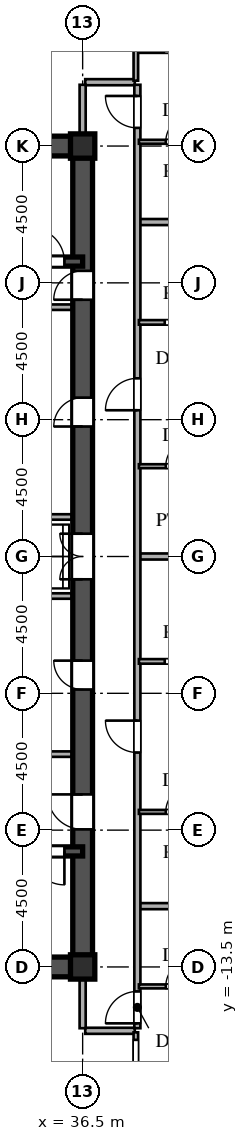
"""IFC4 building model, lengths in metres.
Left out: names, types, materials, properties, quantities, classifications, styles, units other than length and angle.
Written with IfcOpenShell. Run it as: python <this file> out.ifc"""

import sys

from ifc_helpers import new_model, si_unit, direction, frame, frame_2d, origin, origin_2d, place, context, subcontext, project, spatial, rectangle, i_section, extrude, source, transform, mapped, element, fill, save


model = new_model("IFC4")
c1 = context("Model", 3, precision=1e-05, world=origin(), true_north=direction((0.0, 1.0)))
c2 = subcontext(c1, "Body", "Model", "MODEL_VIEW")
j1 = project(units=[si_unit("LENGTHUNIT", "METRE"), si_unit("PLANEANGLEUNIT", "RADIAN")], contexts=[c1])
p1 = place(None, origin())
s1 = spatial("IfcSite", under=j1, at=p1, CompositionType="ELEMENT")
p2 = place(p1, origin())
s2 = spatial("IfcBuilding", under=s1, at=p2, CompositionType="ELEMENT")
p3 = place(p2, frame((0.0, 0.0, 83.7)))
s3 = spatial("IfcBuildingStorey", under=s2, at=p3, CompositionType="ELEMENT", Elevation=83.7)
m1 = source(origin(), c2, "Body", "SweptSolid", [
    extrude(i_section(OverallWidth=0.8, OverallDepth=0.8, WebThickness=0.032, FlangeThickness=0.05, at=origin_2d()), origin(), (0.0, 0.0, 1.0), 3.6),
])
for number, where, z_axis, x_axis in (
    (1, (36.5, -13.5, 0.0), (0.0, 0.0, 1.0), (1.0, 0.0, 0.0)),
    (2, (36.5, 13.5, 0.0), (0.0, 0.0, 1.0), (1.0, 0.0, 0.0)),
):
    element("IfcColumn", number, at=place(p3, frame(where, z_axis=z_axis, x_axis=x_axis)), inside=s3, PredefinedType="COLUMN", context=c2, shape_type="MappedRepresentation", body=[
        mapped(m1, transform((0.0, 0.0, 0.0), scale=1.0)),
    ])
for number, where, z_axis, x_axis in (
    (3, (27.5, -13.5, 0.0), (0.0, 0.0, 1.0), (1.0, 0.0, 0.0)),
    (4, (27.5, 13.5, 0.0), (0.0, 0.0, 1.0), (1.0, 0.0, 0.0)),
):
    element("IfcWall", number, at=place(p3, frame(where, z_axis=z_axis, x_axis=x_axis)), inside=s3, PredefinedType="SHEAR", context=c2, shape_type="SweptSolid", body=[
        extrude(rectangle(XDim=9.0, YDim=0.65, at=frame_2d((4.5, 0.0))), origin(), (0.0, 0.0, 1.0), 3.34),
    ])
p4 = place(p3, frame((36.5, -13.65, 0.0), z_axis=(0.0, 0.0, 1.0), x_axis=(0.0, 1.0, 0.0)))
e5 = element("IfcWall", 5, at=p4, inside=s3, PredefinedType="SHEAR", context=c2, shape_type="SweptSolid", body=[
    extrude(rectangle(XDim=7.15, YDim=0.65, at=frame_2d((3.575, 0.0))), origin(), (0.0, 0.0, 1.0), 3.34),
])
p5 = place(p4, frame((4.675, 0.0, 0.0)))
e6 = element("IfcOpeningElement", 6, at=p5, cuts=e5, PredefinedType="OPENING", context=c2, shape_type="SweptSolid", body=[
    extrude(rectangle(XDim=1.15, YDim=2.2, at=frame_2d((0.575, 1.1))), frame((0.0, 0.335, 0.0), z_axis=(0.0, -1.0, 0.0), x_axis=(1.0, 0.0, 0.0)), (0.0, 0.0, 1.0), 0.67),
])
p6 = place(p3, frame((36.5, -1.3, 0.0), z_axis=(0.0, 0.0, 1.0), x_axis=(0.0, 1.0, 0.0)))
e7 = element("IfcWall", 7, at=p6, inside=s3, PredefinedType="SHEAR", context=c2, shape_type="SweptSolid", body=[
    extrude(rectangle(XDim=2.6, YDim=0.65, at=frame_2d((1.3, 0.0))), origin(), (0.0, 0.0, 1.0), 3.34),
])
p7 = place(p6, frame((0.55, 0.0, 0.0)))
e8 = element("IfcOpeningElement", 8, at=p7, cuts=e7, PredefinedType="OPENING", context=c2, shape_type="SweptSolid", body=[
    extrude(rectangle(XDim=1.5, YDim=2.3, at=frame_2d((0.75, 1.15))), frame((0.0, 0.335, 0.0), z_axis=(0.0, -1.0, 0.0), x_axis=(1.0, 0.0, 0.0)), (0.0, 0.0, 1.0), 0.67),
])
p8 = place(p3, frame((36.5, 8.2, 0.0), z_axis=(0.0, 0.0, 1.0), x_axis=(0.0, 1.0, 0.0)))
e9 = element("IfcWall", 9, at=p8, inside=s3, PredefinedType="SHEAR", context=c2, shape_type="SweptSolid", body=[
    extrude(rectangle(XDim=5.45, YDim=0.65, at=frame_2d((2.725, 0.0))), origin(), (0.0, 0.0, 1.0), 3.34),
])
p9 = place(p8, frame((0.245, 0.0, 0.0)))
e10 = element("IfcOpeningElement", 10, at=p9, cuts=e9, PredefinedType="OPENING", context=c2, shape_type="SweptSolid", body=[
    extrude(rectangle(XDim=0.95, YDim=2.15, at=frame_2d((0.475, 1.075))), frame((0.0, 0.335, 0.0), z_axis=(0.0, -1.0, 0.0), x_axis=(1.0, 0.0, 0.0)), (0.0, 0.0, 1.0), 0.67),
])
p10 = place(p3, frame((36.5, -6.5, 0.0), z_axis=(0.0, 0.0, 1.0), x_axis=(0.0, 1.0, 0.0)))
e11 = element("IfcWall", 11, at=p10, inside=s3, PredefinedType="SHEAR", context=c2, shape_type="SweptSolid", body=[
    extrude(rectangle(XDim=5.2, YDim=0.65, at=frame_2d((2.6, 0.0))), origin(), (0.0, 0.0, 1.0), 3.34),
])
p11 = place(p10, frame((2.125, 0.0, 0.0)))
e12 = element("IfcOpeningElement", 12, at=p11, cuts=e11, PredefinedType="OPENING", context=c2, shape_type="SweptSolid", body=[
    extrude(rectangle(XDim=0.95, YDim=2.15, at=frame_2d((0.475, 1.075))), frame((0.0, 0.335, 0.0), z_axis=(0.0, -1.0, 0.0), x_axis=(1.0, 0.0, 0.0)), (0.0, 0.0, 1.0), 0.67),
])
p12 = place(p3, frame((36.5, 1.3, 0.0), z_axis=(0.0, 0.0, 1.0), x_axis=(0.0, 1.0, 0.0)))
e13 = element("IfcWall", 13, at=p12, inside=s3, PredefinedType="SHEAR", context=c2, shape_type="SweptSolid", body=[
    extrude(rectangle(XDim=6.9, YDim=0.65, at=frame_2d((3.45, 0.0))), origin(), (0.0, 0.0, 1.0), 3.34),
])
p13 = place(p12, frame((2.975, 0.0, 0.0)))
e14 = element("IfcOpeningElement", 14, at=p13, cuts=e13, PredefinedType="OPENING", context=c2, shape_type="SweptSolid", body=[
    extrude(rectangle(XDim=0.95, YDim=2.15, at=frame_2d((0.475, 1.075))), frame((0.0, 0.335, 0.0), z_axis=(0.0, -1.0, 0.0), x_axis=(1.0, 0.0, 0.0)), (0.0, 0.0, 1.0), 0.67),
])
p14 = place(p3, frame((27.5, -9.7, 0.0), z_axis=(0.0, 0.0, 1.0), x_axis=(1.0, 0.0, 0.0)))
e15 = element("IfcWall", 15, at=p14, inside=s3, PredefinedType="SHEAR", context=c2, shape_type="SweptSolid", body=[
    extrude(rectangle(XDim=9.0, YDim=0.3, at=frame_2d((4.5, 0.0))), origin(), (0.0, 0.0, 1.0), 3.34),
])
p15 = place(p14, frame((7.3, 0.0, 0.0)))
e16 = element("IfcOpeningElement", 16, at=p15, cuts=e15, PredefinedType="OPENING", context=c2, shape_type="SweptSolid", body=[
    extrude(rectangle(XDim=1.1, YDim=2.2, at=frame_2d((0.55, 1.1))), frame((0.0, 0.16, 0.0), z_axis=(0.0, -1.0, 0.0), x_axis=(1.0, 0.0, 0.0)), (0.0, 0.0, 1.0), 0.32),
])
p16 = place(p3, frame((27.5, 9.7, 0.0), z_axis=(0.0, 0.0, 1.0), x_axis=(1.0, 0.0, 0.0)))
e17 = element("IfcWall", 17, at=p16, inside=s3, PredefinedType="SHEAR", context=c2, shape_type="SweptSolid", body=[
    extrude(rectangle(XDim=9.0, YDim=0.3, at=frame_2d((4.5, 0.0))), origin(), (0.0, 0.0, 1.0), 3.34),
])
p17 = place(p16, frame((7.3, 0.0, 0.0)))
e18 = element("IfcOpeningElement", 18, at=p17, cuts=e17, PredefinedType="OPENING", context=c2, shape_type="SweptSolid", body=[
    extrude(rectangle(XDim=1.1, YDim=2.2, at=frame_2d((0.55, 1.1))), frame((0.0, 0.16, 0.0), z_axis=(0.0, -1.0, 0.0), x_axis=(1.0, 0.0, 0.0)), (0.0, 0.0, 1.0), 0.32),
])
for number, where, z_axis, x_axis in (
    (19, (30.45, -6.5, 0.0), (0.0, 0.0, 1.0), (1.0, 0.0, 0.0)),
    (20, (30.45, 8.2, 0.0), (0.0, 0.0, 1.0), (1.0, 0.0, 0.0)),
):
    element("IfcWall", number, at=place(p3, frame(where, z_axis=z_axis, x_axis=x_axis)), inside=s3, PredefinedType="PARTITIONING", context=c2, shape_type="SweptSolid", body=[
        extrude(rectangle(XDim=5.7, YDim=0.18, at=frame_2d((2.85, 0.0))), origin(), (0.0, 0.0, 1.0), 3.34),
    ])
for number, where, z_axis, x_axis in (
    (21, (33.2, -1.3, 0.0), (0.0, 0.0, 1.0), (1.0, 0.0, 0.0)),
    (22, (33.2, 1.3, 0.0), (0.0, 0.0, 1.0), (1.0, 0.0, 0.0)),
):
    element("IfcWall", number, at=place(p3, frame(where, z_axis=z_axis, x_axis=x_axis)), inside=s3, PredefinedType="PARTITIONING", context=c2, shape_type="SweptSolid", body=[
        extrude(rectangle(XDim=2.95, YDim=0.18, at=frame_2d((1.475, 0.0))), origin(), (0.0, 0.0, 1.0), 3.34),
    ])
p18 = place(p3, frame((36.585, -15.6, 0.0), z_axis=(0.0, 0.0, 1.0), x_axis=(1.0, 0.0, 0.0)))
e23 = element("IfcWall", 23, at=p18, inside=s3, PredefinedType="PARTITIONING", context=c2, shape_type="SweptSolid", body=[
    extrude(rectangle(XDim=1.63, YDim=0.2, at=frame_2d((0.815, 0.0))), origin(), (0.0, 0.0, 1.0), 3.34),
])
p19 = place(p3, frame((38.35, -14.14, 0.0), z_axis=(0.0, 0.0, 1.0), x_axis=(1.0, 0.0, 0.0)))
e24 = element("IfcWall", 24, at=p19, inside=s3, PredefinedType="PARTITIONING", context=c2, shape_type="SweptSolid", body=[
    extrude(rectangle(XDim=2.65, YDim=0.13, at=frame_2d((1.325, 0.0))), origin(), (0.0, 0.0, 1.0), 3.34),
])
p20 = place(p19, frame((0.885, 0.0, 0.0)))
e25 = element("IfcOpeningElement", 25, at=p20, cuts=e24, PredefinedType="OPENING", context=c2, shape_type="SweptSolid", body=[
    extrude(rectangle(XDim=0.88, YDim=2.1, at=frame_2d((0.44, 1.05))), frame((0.0, 0.075, 0.0), z_axis=(0.0, -1.0, 0.0), x_axis=(1.0, 0.0, 0.0)), (0.0, 0.0, 1.0), 0.15),
])
p21 = place(p3, frame((38.38, -11.5, 0.0), z_axis=(0.0, 0.0, 1.0), x_axis=(1.0, 0.0, 0.0)))
e26 = element("IfcWall", 26, at=p21, inside=s3, PredefinedType="PARTITIONING", context=c2, shape_type="SweptSolid", body=[
    extrude(rectangle(XDim=23.743, YDim=0.2, at=frame_2d((11.872, 0.0))), origin(), (0.0, 0.0, 1.0), 3.34),
])
p22 = place(p3, frame((38.35, -8.4, 0.0), z_axis=(0.0, 0.0, 1.0), x_axis=(1.0, 0.0, 0.0)))
e27 = element("IfcWall", 27, at=p22, inside=s3, PredefinedType="PARTITIONING", context=c2, shape_type="SweptSolid", body=[
    extrude(rectangle(XDim=2.65, YDim=0.13, at=frame_2d((1.325, 0.0))), origin(), (0.0, 0.0, 1.0), 3.34),
])
p23 = place(p22, frame((0.885, 0.0, 0.0)))
e28 = element("IfcOpeningElement", 28, at=p23, cuts=e27, PredefinedType="OPENING", context=c2, shape_type="SweptSolid", body=[
    extrude(rectangle(XDim=0.88, YDim=2.1, at=frame_2d((0.44, 1.05))), frame((0.0, 0.075, 0.0), z_axis=(0.0, -1.0, 0.0), x_axis=(1.0, 0.0, 0.0)), (0.0, 0.0, 1.0), 0.15),
])
p24 = place(p3, frame((38.35, -3.45, 0.0), z_axis=(0.0, 0.0, 1.0), x_axis=(1.0, 0.0, 0.0)))
e29 = element("IfcWall", 29, at=p24, inside=s3, PredefinedType="PARTITIONING", context=c2, shape_type="SweptSolid", body=[
    extrude(rectangle(XDim=2.65, YDim=0.15, at=frame_2d((1.325, 0.0))), origin(), (0.0, 0.0, 1.0), 3.34),
])
p25 = place(p24, frame((0.85, 0.0, 0.0)))
e30 = element("IfcOpeningElement", 30, at=p25, cuts=e29, PredefinedType="OPENING", context=c2, shape_type="SweptSolid", body=[
    extrude(rectangle(XDim=0.95, YDim=2.15, at=frame_2d((0.475, 1.075))), frame((0.0, 0.085, 0.0), z_axis=(0.0, -1.0, 0.0), x_axis=(1.0, 0.0, 0.0)), (0.0, 0.0, 1.0), 0.17),
])
p26 = place(p3, frame((38.38, 0.0, 0.0), z_axis=(0.0, 0.0, 1.0), x_axis=(1.0, 0.0, 0.0)))
e31 = element("IfcWall", 31, at=p26, inside=s3, PredefinedType="PARTITIONING", context=c2, shape_type="SweptSolid", body=[
    extrude(rectangle(XDim=25.1, YDim=0.2, at=frame_2d((12.55, 0.0))), origin(), (0.0, 0.0, 1.0), 3.34),
])
p27 = place(p3, frame((38.35, 2.97, 0.0), z_axis=(0.0, 0.0, 1.0), x_axis=(1.0, 0.0, 0.0)))
e32 = element("IfcWall", 32, at=p27, inside=s3, PredefinedType="PARTITIONING", context=c2, shape_type="SweptSolid", body=[
    extrude(rectangle(XDim=2.65, YDim=0.13, at=frame_2d((1.325, 0.0))), origin(), (0.0, 0.0, 1.0), 3.34),
])
p28 = place(p27, frame((0.885, 0.0, 0.0)))
e33 = element("IfcOpeningElement", 33, at=p28, cuts=e32, PredefinedType="OPENING", context=c2, shape_type="SweptSolid", body=[
    extrude(rectangle(XDim=0.88, YDim=2.1, at=frame_2d((0.44, 1.05))), frame((0.0, 0.075, 0.0), z_axis=(0.0, -1.0, 0.0), x_axis=(1.0, 0.0, 0.0)), (0.0, 0.0, 1.0), 0.15),
])
p29 = place(p3, frame((38.35, 7.7, 0.0), z_axis=(0.0, 0.0, 1.0), x_axis=(1.0, 0.0, 0.0)))
e34 = element("IfcWall", 34, at=p29, inside=s3, PredefinedType="PARTITIONING", context=c2, shape_type="SweptSolid", body=[
    extrude(rectangle(XDim=2.65, YDim=0.15, at=frame_2d((1.325, 0.0))), origin(), (0.0, 0.0, 1.0), 3.34),
])
p30 = place(p29, frame((0.85, 0.0, 0.0)))
e35 = element("IfcOpeningElement", 35, at=p30, cuts=e34, PredefinedType="OPENING", context=c2, shape_type="SweptSolid", body=[
    extrude(rectangle(XDim=0.95, YDim=2.15, at=frame_2d((0.475, 1.075))), frame((0.0, 0.085, 0.0), z_axis=(0.0, -1.0, 0.0), x_axis=(1.0, 0.0, 0.0)), (0.0, 0.0, 1.0), 0.17),
])
p31 = place(p3, frame((38.38, 11.0, 0.0), z_axis=(0.0, 0.0, 1.0), x_axis=(1.0, 0.0, 0.0)))
e36 = element("IfcWall", 36, at=p31, inside=s3, PredefinedType="PARTITIONING", context=c2, shape_type="SweptSolid", body=[
    extrude(rectangle(XDim=24.854, YDim=0.2, at=frame_2d((12.427, 0.0))), origin(), (0.0, 0.0, 1.0), 3.34),
])
p32 = place(p3, frame((38.35, 13.64, 0.0), z_axis=(0.0, 0.0, 1.0), x_axis=(1.0, 0.0, 0.0)))
e37 = element("IfcWall", 37, at=p32, inside=s3, PredefinedType="PARTITIONING", context=c2, shape_type="SweptSolid", body=[
    extrude(rectangle(XDim=2.65, YDim=0.13, at=frame_2d((1.325, 0.0))), origin(), (0.0, 0.0, 1.0), 2.44),
])
p33 = place(p32, frame((0.885, 0.0, 0.0)))
e38 = element("IfcOpeningElement", 38, at=p33, cuts=e37, PredefinedType="OPENING", context=c2, shape_type="SweptSolid", body=[
    extrude(rectangle(XDim=0.88, YDim=2.1, at=frame_2d((0.44, 1.05))), frame((0.0, 0.075, 0.0), z_axis=(0.0, -1.0, 0.0), x_axis=(1.0, 0.0, 0.0)), (0.0, 0.0, 1.0), 0.15),
])
p34 = place(p3, frame((36.585, 15.6, 0.0), z_axis=(0.0, 0.0, 1.0), x_axis=(1.0, 0.0, 0.0)))
e39 = element("IfcWall", 39, at=p34, inside=s3, PredefinedType="PARTITIONING", context=c2, shape_type="SweptSolid", body=[
    extrude(rectangle(XDim=1.63, YDim=0.2, at=frame_2d((0.815, 0.0))), origin(), (0.0, 0.0, 1.0), 3.34),
])
p35 = place(p3, frame((38.3, 16.64, 0.0), z_axis=(0.0, 0.0, 1.0), x_axis=(1.0, 0.0, 0.0)))
e40 = element("IfcWall", 40, at=p35, inside=s3, PredefinedType="PARTITIONING", context=c2, shape_type="SweptSolid", body=[
    extrude(rectangle(XDim=2.7, YDim=0.15, at=frame_2d((1.35, 0.0))), origin(), (0.0, 0.0, 1.0), 3.34),
])
p36 = place(p35, frame((0.875, 0.0, 0.0)))
e41 = element("IfcOpeningElement", 41, at=p36, cuts=e40, PredefinedType="OPENING", context=c2, shape_type="SweptSolid", body=[
    extrude(rectangle(XDim=0.95, YDim=2.15, at=frame_2d((0.475, 1.075))), frame((0.0, 0.085, 0.0), z_axis=(0.0, -1.0, 0.0), x_axis=(1.0, 0.0, 0.0)), (0.0, 0.0, 1.0), 0.17),
])
for number, where, z_axis, x_axis in (
    (42, (36.5, -15.515, 0.0), (0.0, 0.0, 1.0), (0.0, 1.0, 0.0)),
    (43, (36.5, 13.83, 0.0), (0.0, 0.0, 1.0), (0.0, 1.0, 0.0)),
):
    element("IfcWall", number, at=place(p3, frame(where, z_axis=z_axis, x_axis=x_axis)), inside=s3, PredefinedType="PARTITIONING", context=c2, shape_type="SweptSolid", body=[
        extrude(rectangle(XDim=1.685, YDim=0.2, at=frame_2d((0.842, 0.0))), origin(), (0.0, 0.0, 1.0), 2.44),
    ])
p37 = place(p3, frame((38.25, -22.273, 0.0), z_axis=(0.0, 0.0, 1.0), x_axis=(0.0, 1.0, 0.0)))
e44 = element("IfcWall", 44, at=p37, inside=s3, PredefinedType="PARTITIONING", context=c2, shape_type="SweptSolid", body=[
    extrude(rectangle(XDim=6.623, YDim=0.15, at=frame_2d((3.312, 0.0))), origin(), (0.0, 0.0, 1.0), 3.34),
])
p38 = place(p37, frame((5.426, 0.0, 0.0)))
e45 = element("IfcOpeningElement", 45, at=p38, cuts=e44, PredefinedType="OPENING", context=c2, shape_type="SweptSolid", body=[
    extrude(rectangle(XDim=0.95, YDim=2.15, at=frame_2d((0.475, 1.075))), frame((0.0, 0.085, 0.0), z_axis=(0.0, -1.0, 0.0), x_axis=(1.0, 0.0, 0.0)), (0.0, 0.0, 1.0), 0.17),
])
p39 = place(p3, frame((38.25, 15.65, 0.0), z_axis=(0.0, 0.0, 1.0), x_axis=(0.0, 1.0, 0.0)))
e46 = element("IfcWall", 46, at=p39, inside=s3, PredefinedType="PARTITIONING", context=c2, shape_type="SweptSolid", body=[
    extrude(rectangle(XDim=6.623, YDim=0.15, at=frame_2d((3.312, 0.0))), origin(), (0.0, 0.0, 1.0), 3.34),
])
p40 = place(p39, frame((1.948, 0.0, 0.0)))
e47 = element("IfcOpeningElement", 47, at=p40, cuts=e46, PredefinedType="OPENING", context=c2, shape_type="SweptSolid", body=[
    extrude(rectangle(XDim=0.95, YDim=2.15, at=frame_2d((0.475, 1.075))), frame((0.0, 0.085, 0.0), z_axis=(0.0, -1.0, 0.0), x_axis=(1.0, 0.0, 0.0)), (0.0, 0.0, 1.0), 0.17),
])
p41 = place(p3, frame((38.3, -15.515, 0.0), z_axis=(0.0, 0.0, 1.0), x_axis=(0.0, 1.0, 0.0)))
e48 = element("IfcWall", 48, at=p41, inside=s3, PredefinedType="PARTITIONING", context=c2, shape_type="SweptSolid", body=[
    extrude(rectangle(XDim=31.03, YDim=0.2, at=frame_2d((15.515, 0.0))), origin(), (0.0, 0.0, 1.0), 3.34),
])
p42 = place(p41, frame((0.16, 0.0, 0.0)))
e49 = element("IfcOpeningElement", 49, at=p42, cuts=e48, PredefinedType="OPENING", context=c2, shape_type="SweptSolid", body=[
    extrude(rectangle(XDim=1.05, YDim=2.25, at=frame_2d((0.525, 1.125))), frame((0.0, 0.11, 0.0), z_axis=(0.0, -1.0, 0.0), x_axis=(1.0, 0.0, 0.0)), (0.0, 0.0, 1.0), 0.22),
])
p43 = place(p41, frame((9.067, 0.0, 0.0)))
e50 = element("IfcOpeningElement", 50, at=p43, cuts=e48, PredefinedType="OPENING", context=c2, shape_type="SweptSolid", body=[
    extrude(rectangle(XDim=1.05, YDim=2.25, at=frame_2d((0.525, 1.125))), frame((0.0, 0.11, 0.0), z_axis=(0.0, -1.0, 0.0), x_axis=(1.0, 0.0, 0.0)), (0.0, 0.0, 1.0), 0.22),
])
p44 = place(p41, frame((20.325, 0.0, 0.0)))
e51 = element("IfcOpeningElement", 51, at=p44, cuts=e48, PredefinedType="OPENING", context=c2, shape_type="SweptSolid", body=[
    extrude(rectangle(XDim=1.05, YDim=2.25, at=frame_2d((0.525, 1.125))), frame((0.0, 0.11, 0.0), z_axis=(0.0, -1.0, 0.0), x_axis=(1.0, 0.0, 0.0)), (0.0, 0.0, 1.0), 0.22),
])
p45 = place(p41, frame((29.613, 0.0, 0.0)))
e52 = element("IfcOpeningElement", 52, at=p45, cuts=e48, PredefinedType="OPENING", context=c2, shape_type="SweptSolid", body=[
    extrude(rectangle(XDim=1.05, YDim=2.25, at=frame_2d((0.525, 1.125))), frame((0.0, 0.11, 0.0), z_axis=(0.0, -1.0, 0.0), x_axis=(1.0, 0.0, 0.0)), (0.0, 0.0, 1.0), 0.22),
])
m2 = source(origin(), c2, "Body", "SweptSolid", [
    extrude(rectangle(XDim=1.15, YDim=2.2, at=frame_2d((0.575, 1.1))), frame((0.0, 0.025, 0.0), z_axis=(0.0, -1.0, 0.0), x_axis=(1.0, 0.0, 0.0)), (0.0, 0.0, 1.0), 0.05),
])
p46 = place(p5, origin())
e53 = element("IfcDoor", 53, at=p46, inside=s3, OperationType="SINGLE_SWING_RIGHT", PredefinedType="DOOR", context=c2, shape_type="MappedRepresentation", body=[
    mapped(m2, transform((0.0, 0.0, 0.0), scale=1.0)),
])
fill(e6, e53)
m3 = source(origin(), c2, "Body", "SweptSolid", [
    extrude(rectangle(XDim=1.5, YDim=2.3, at=frame_2d((0.75, 1.15))), frame((0.0, 0.025, 0.0), z_axis=(0.0, -1.0, 0.0), x_axis=(1.0, 0.0, 0.0)), (0.0, 0.0, 1.0), 0.05),
])
p47 = place(p7, origin())
e54 = element("IfcDoor", 54, at=p47, inside=s3, OperationType="DOUBLE_SWING_LEFT", PredefinedType="DOOR", context=c2, shape_type="MappedRepresentation", body=[
    mapped(m3, transform((0.0, 0.0, 0.0), scale=1.0)),
])
fill(e8, e54)
m4 = source(origin(), c2, "Body", "SweptSolid", [
    extrude(rectangle(XDim=0.95, YDim=2.15, at=frame_2d((0.475, 1.075))), frame((0.0, 0.025, 0.0), z_axis=(0.0, -1.0, 0.0), x_axis=(1.0, 0.0, 0.0)), (0.0, 0.0, 1.0), 0.05),
])
p48 = place(p9, origin())
e55 = element("IfcDoor", 55, at=p48, inside=s3, OperationType="SINGLE_SWING_LEFT", PredefinedType="DOOR", context=c2, shape_type="MappedRepresentation", body=[
    mapped(m4, transform((0.0, 0.0, 0.0), scale=1.0)),
])
fill(e10, e55)
p49 = place(p11, origin())
e56 = element("IfcDoor", 56, at=p49, inside=s3, OperationType="SINGLE_SWING_RIGHT", PredefinedType="DOOR", context=c2, shape_type="MappedRepresentation", body=[
    mapped(m4, transform((0.0, 0.0, 0.0), scale=1.0)),
])
fill(e12, e56)
p50 = place(p13, origin())
e57 = element("IfcDoor", 57, at=p50, inside=s3, OperationType="SINGLE_SWING_LEFT", PredefinedType="DOOR", context=c2, shape_type="MappedRepresentation", body=[
    mapped(m4, transform((0.0, 0.0, 0.0), scale=1.0)),
])
fill(e14, e57)
m5 = source(origin(), c2, "Body", "SweptSolid", [
    extrude(rectangle(XDim=1.1, YDim=2.2, at=frame_2d((0.55, 1.1))), frame((0.0, 0.025, 0.0), z_axis=(0.0, -1.0, 0.0), x_axis=(1.0, 0.0, 0.0)), (0.0, 0.0, 1.0), 0.05),
])
p51 = place(p15, frame((1.1, 0.0, 0.0), z_axis=(0.0, 0.0, 1.0), x_axis=(-1.0, 0.0, 0.0)))
e58 = element("IfcDoor", 58, at=p51, inside=s3, OperationType="SINGLE_SWING_RIGHT", PredefinedType="DOOR", context=c2, shape_type="MappedRepresentation", body=[
    mapped(m5, transform((0.0, 0.0, 0.0), scale=1.0)),
])
fill(e16, e58)
p52 = place(p17, origin())
e59 = element("IfcDoor", 59, at=p52, inside=s3, OperationType="SINGLE_SWING_LEFT", PredefinedType="DOOR", context=c2, shape_type="MappedRepresentation", body=[
    mapped(m5, transform((0.0, 0.0, 0.0), scale=1.0)),
])
fill(e18, e59)
m6 = source(origin(), c2, "Body", "SweptSolid", [
    extrude(rectangle(XDim=0.88, YDim=2.1, at=frame_2d((0.44, 1.05))), frame((0.0, 0.025, 0.0), z_axis=(0.0, -1.0, 0.0), x_axis=(1.0, 0.0, 0.0)), (0.0, 0.0, 1.0), 0.05),
])
p53 = place(p20, origin())
e60 = element("IfcDoor", 60, at=p53, inside=s3, OperationType="SINGLE_SWING_RIGHT", PredefinedType="DOOR", context=c2, shape_type="MappedRepresentation", body=[
    mapped(m6, transform((0.0, 0.0, 0.0), scale=1.0)),
])
fill(e25, e60)
p54 = place(p23, origin())
e61 = element("IfcDoor", 61, at=p54, inside=s3, OperationType="SINGLE_SWING_RIGHT", PredefinedType="DOOR", context=c2, shape_type="MappedRepresentation", body=[
    mapped(m6, transform((0.0, 0.0, 0.0), scale=1.0)),
])
fill(e28, e61)
p55 = place(p28, origin())
e62 = element("IfcDoor", 62, at=p55, inside=s3, OperationType="SINGLE_SWING_RIGHT", PredefinedType="DOOR", context=c2, shape_type="MappedRepresentation", body=[
    mapped(m6, transform((0.0, 0.0, 0.0), scale=1.0)),
])
fill(e33, e62)
p56 = place(p33, origin())
e63 = element("IfcDoor", 63, at=p56, inside=s3, OperationType="SINGLE_SWING_RIGHT", PredefinedType="DOOR", context=c2, shape_type="MappedRepresentation", body=[
    mapped(m6, transform((0.0, 0.0, 0.0), scale=1.0)),
])
fill(e38, e63)
m7 = source(origin(), c2, "Body", "SweptSolid", [
    extrude(rectangle(XDim=1.05, YDim=2.25, at=frame_2d((0.525, 1.125))), frame((0.0, 0.025, 0.0), z_axis=(0.0, -1.0, 0.0), x_axis=(1.0, 0.0, 0.0)), (0.0, 0.0, 1.0), 0.05),
])
p57 = place(p42, origin())
e64 = element("IfcDoor", 64, at=p57, inside=s3, OperationType="SINGLE_SWING_LEFT", PredefinedType="DOOR", context=c2, shape_type="MappedRepresentation", body=[
    mapped(m7, transform((0.0, 0.0, 0.0), scale=1.0)),
])
fill(e49, e64)
p58 = place(p43, origin())
e65 = element("IfcDoor", 65, at=p58, inside=s3, OperationType="SINGLE_SWING_RIGHT", PredefinedType="DOOR", context=c2, shape_type="MappedRepresentation", body=[
    mapped(m7, transform((0.0, 0.0, 0.0), scale=1.0)),
])
fill(e50, e65)
p59 = place(p44, origin())
e66 = element("IfcDoor", 66, at=p59, inside=s3, OperationType="SINGLE_SWING_LEFT", PredefinedType="DOOR", context=c2, shape_type="MappedRepresentation", body=[
    mapped(m7, transform((0.0, 0.0, 0.0), scale=1.0)),
])
fill(e51, e66)
p60 = place(p45, origin())
e67 = element("IfcDoor", 67, at=p60, inside=s3, OperationType="SINGLE_SWING_RIGHT", PredefinedType="DOOR", context=c2, shape_type="MappedRepresentation", body=[
    mapped(m7, transform((0.0, 0.0, 0.0), scale=1.0)),
])
fill(e52, e67)
save(model, sys.argv[1])
